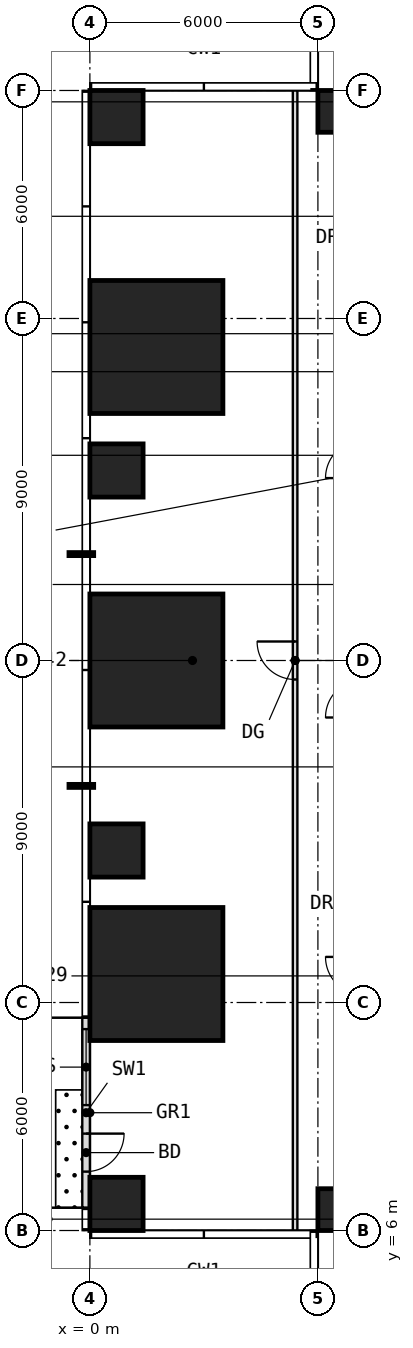
"""IFC4 building model, lengths in metres.
Left out: names, types, materials, properties, quantities, classifications, styles, units other than length and angle.
Written with IfcOpenShell. Run it as: python <this file> out.ifc"""

import sys

from ifc_helpers import new_model, si_unit, direction, frame, frame_2d, origin, origin_2d, place, context, subcontext, project, spatial, rectangle, extrude, element, fill, save


model = new_model("IFC4")
c1 = context("Model", 3, precision=1e-05, world=origin(), true_north=direction((0.0, 1.0)))
c2 = subcontext(c1, "Body", "Model", "MODEL_VIEW")
j1 = project(units=[si_unit("LENGTHUNIT", "METRE"), si_unit("PLANEANGLEUNIT", "RADIAN")], contexts=[c1])
p1 = place(None, origin())
s1 = spatial("IfcSite", under=j1, at=p1, CompositionType="ELEMENT")
p2 = place(p1, origin())
s2 = spatial("IfcBuilding", under=s1, at=p2, CompositionType="ELEMENT")
p3 = place(p2, frame((0.0, 0.0, 22.5)))
s3 = spatial("IfcBuildingStorey", under=s2, at=p3, CompositionType="ELEMENT", Elevation=22.5)
p4 = place(p3, frame((0.7, 6.7, 0.0), z_axis=(0.0, 0.0, 1.0), x_axis=(1.0, 0.0, 0.0)))
e1 = element("IfcColumn", 1, at=p4, inside=s3, PredefinedType="COLUMN", context=c2, shape_type="SweptSolid", body=[
    extrude(rectangle(XDim=1.4, YDim=1.4, at=origin_2d()), origin(), (0.0, 0.0, 1.0), 4.0),
])
p5 = place(p3, frame((6.55, 6.55, 0.0), z_axis=(0.0, 0.0, 1.0), x_axis=(1.0, 0.0, 0.0)))
e2 = element("IfcColumn", 2, at=p5, inside=s3, PredefinedType="COLUMN", context=c2, shape_type="SweptSolid", body=[
    extrude(rectangle(XDim=1.1, YDim=1.1, at=origin_2d()), origin(), (0.0, 0.0, 1.0), 4.0),
])
p6 = place(p3, frame((1.75, 12.75, 0.0), z_axis=(0.0, 0.0, 1.0), x_axis=(1.0, 0.0, 0.0)))
e3 = element("IfcColumn", 3, at=p6, inside=s3, PredefinedType="COLUMN", context=c2, shape_type="SweptSolid", body=[
    extrude(rectangle(XDim=3.5, YDim=3.5, at=origin_2d()), origin(), (0.0, 0.0, 1.0), 4.0),
])
p7 = place(p3, frame((0.7, 16.0, 0.0), z_axis=(0.0, 0.0, 1.0), x_axis=(1.0, 0.0, 0.0)))
e4 = element("IfcColumn", 4, at=p7, inside=s3, PredefinedType="COLUMN", context=c2, shape_type="SweptSolid", body=[
    extrude(rectangle(XDim=1.4, YDim=1.4, at=origin_2d()), origin(), (0.0, 0.0, 1.0), 4.0),
])
p8 = place(p3, frame((1.75, 21.0, 0.0), z_axis=(0.0, 0.0, 1.0), x_axis=(1.0, 0.0, 0.0)))
e5 = element("IfcColumn", 5, at=p8, inside=s3, PredefinedType="COLUMN", context=c2, shape_type="SweptSolid", body=[
    extrude(rectangle(XDim=3.5, YDim=3.5, at=origin_2d()), origin(), (0.0, 0.0, 1.0), 4.0),
])
p9 = place(p3, frame((0.7, 26.0, 0.0), z_axis=(0.0, 0.0, 1.0), x_axis=(1.0, 0.0, 0.0)))
e6 = element("IfcColumn", 6, at=p9, inside=s3, PredefinedType="COLUMN", context=c2, shape_type="SweptSolid", body=[
    extrude(rectangle(XDim=1.4, YDim=1.4, at=origin_2d()), origin(), (0.0, 0.0, 1.0), 4.0),
])
p10 = place(p3, frame((1.75, 29.25, 0.0), z_axis=(0.0, 0.0, 1.0), x_axis=(1.0, 0.0, 0.0)))
e7 = element("IfcColumn", 7, at=p10, inside=s3, PredefinedType="COLUMN", context=c2, shape_type="SweptSolid", body=[
    extrude(rectangle(XDim=3.5, YDim=3.5, at=origin_2d()), origin(), (0.0, 0.0, 1.0), 4.0),
])
p11 = place(p3, frame((0.7, 35.3, 0.0), z_axis=(0.0, 0.0, 1.0), x_axis=(1.0, 0.0, 0.0)))
e8 = element("IfcColumn", 8, at=p11, inside=s3, PredefinedType="COLUMN", context=c2, shape_type="SweptSolid", body=[
    extrude(rectangle(XDim=1.4, YDim=1.4, at=origin_2d()), origin(), (0.0, 0.0, 1.0), 4.0),
])
p12 = place(p3, frame((6.55, 35.45, 0.0), z_axis=(0.0, 0.0, 1.0), x_axis=(1.0, 0.0, 0.0)))
e9 = element("IfcColumn", 9, at=p12, inside=s3, PredefinedType="COLUMN", context=c2, shape_type="SweptSolid", body=[
    extrude(rectangle(XDim=1.1, YDim=1.1, at=origin_2d()), origin(), (0.0, 0.0, 1.0), 4.0),
])
p13 = place(p3, frame((-0.1, 11.6, 0.0), z_axis=(0.0, 0.0, 1.0), x_axis=(0.0, -1.0, 0.0)))
e10 = element("IfcWall", 10, at=p13, inside=s3, PredefinedType="USERDEFINED", context=c2, shape_type="SweptSolid", body=[
    extrude(rectangle(XDim=5.0, YDim=0.2, at=frame_2d((2.5, 0.0))), origin(), (0.0, 0.0, 1.0), 3.75),
])
p14 = place(p13, frame((3.05, 0.0, 0.0)))
e11 = element("IfcOpeningElement", 11, at=p14, cuts=e10, PredefinedType="OPENING", context=c2, shape_type="SweptSolid", body=[
    extrude(rectangle(XDim=1.0, YDim=2.4, at=frame_2d((0.5, 1.2))), frame((0.0, 0.11, 0.0), z_axis=(0.0, -1.0, 0.0), x_axis=(1.0, 0.0, 0.0)), (0.0, 0.0, 1.0), 0.22),
])
p15 = place(p13, frame((0.3, 0.0, 0.3)))
e12 = element("IfcOpeningElement", 12, at=p15, cuts=e10, PredefinedType="OPENING", context=c2, shape_type="SweptSolid", body=[
    extrude(rectangle(XDim=2.0, YDim=2.7, at=frame_2d((1.0, 1.35))), frame((0.0, 0.11, 0.0), z_axis=(0.0, -1.0, 0.0), x_axis=(1.0, 0.0, 0.0)), (0.0, 0.0, 1.0), 0.22),
])
p16 = place(p3, frame((5.4, 6.0, 0.0), z_axis=(0.0, 0.0, 1.0), x_axis=(0.0, 1.0, 0.0)))
e13 = element("IfcWall", 13, at=p16, inside=s3, PredefinedType="PARTITIONING", context=c2, shape_type="SweptSolid", body=[
    extrude(rectangle(XDim=30.0, YDim=0.12, at=frame_2d((15.0, 0.0))), origin(), (0.0, 0.0, 1.0), 3.75),
])
p17 = place(p16, frame((14.5, 0.0, 0.0)))
e14 = element("IfcOpeningElement", 14, at=p17, cuts=e13, PredefinedType="OPENING", context=c2, shape_type="SweptSolid", body=[
    extrude(rectangle(XDim=1.0, YDim=2.4, at=frame_2d((0.5, 1.2))), frame((0.0, 0.07, 0.0), z_axis=(0.0, -1.0, 0.0), x_axis=(1.0, 0.0, 0.0)), (0.0, 0.0, 1.0), 0.14),
])
p18 = place(p14, origin())
e15 = element("IfcDoor", 15, at=p18, inside=s3, OperationType="SINGLE_SWING_LEFT", PredefinedType="DOOR", context=c2, shape_type="SweptSolid", body=[
    extrude(rectangle(XDim=1.0, YDim=2.4, at=frame_2d((0.5, 1.2))), frame((0.0, 0.025, 0.0), z_axis=(0.0, -1.0, 0.0), x_axis=(1.0, 0.0, 0.0)), (0.0, 0.0, 1.0), 0.05),
])
fill(e11, e15)
p19 = place(p15, origin())
e16 = element("IfcWindow", 16, at=p19, inside=s3, PartitioningType="SINGLE_PANEL", PredefinedType="WINDOW", context=c2, shape_type="SweptSolid", body=[
    extrude(rectangle(XDim=2.0, YDim=2.7, at=frame_2d((1.0, 1.35))), frame((0.0, 0.03, 0.0), z_axis=(0.0, -1.0, 0.0), x_axis=(1.0, 0.0, 0.0)), (0.0, 0.0, 1.0), 0.06),
])
fill(e12, e16)
p20 = place(p17, origin())
e17 = element("IfcDoor", 17, at=p20, inside=s3, OperationType="SINGLE_SWING_RIGHT", PredefinedType="DOOR", context=c2, shape_type="SweptSolid", body=[
    extrude(rectangle(XDim=1.0, YDim=2.4, at=frame_2d((0.5, 1.2))), frame((0.0, 0.025, 0.0), z_axis=(0.0, -1.0, 0.0), x_axis=(1.0, 0.0, 0.0)), (0.0, 0.0, 1.0), 0.05),
])
fill(e14, e17)
save(model, sys.argv[1])
